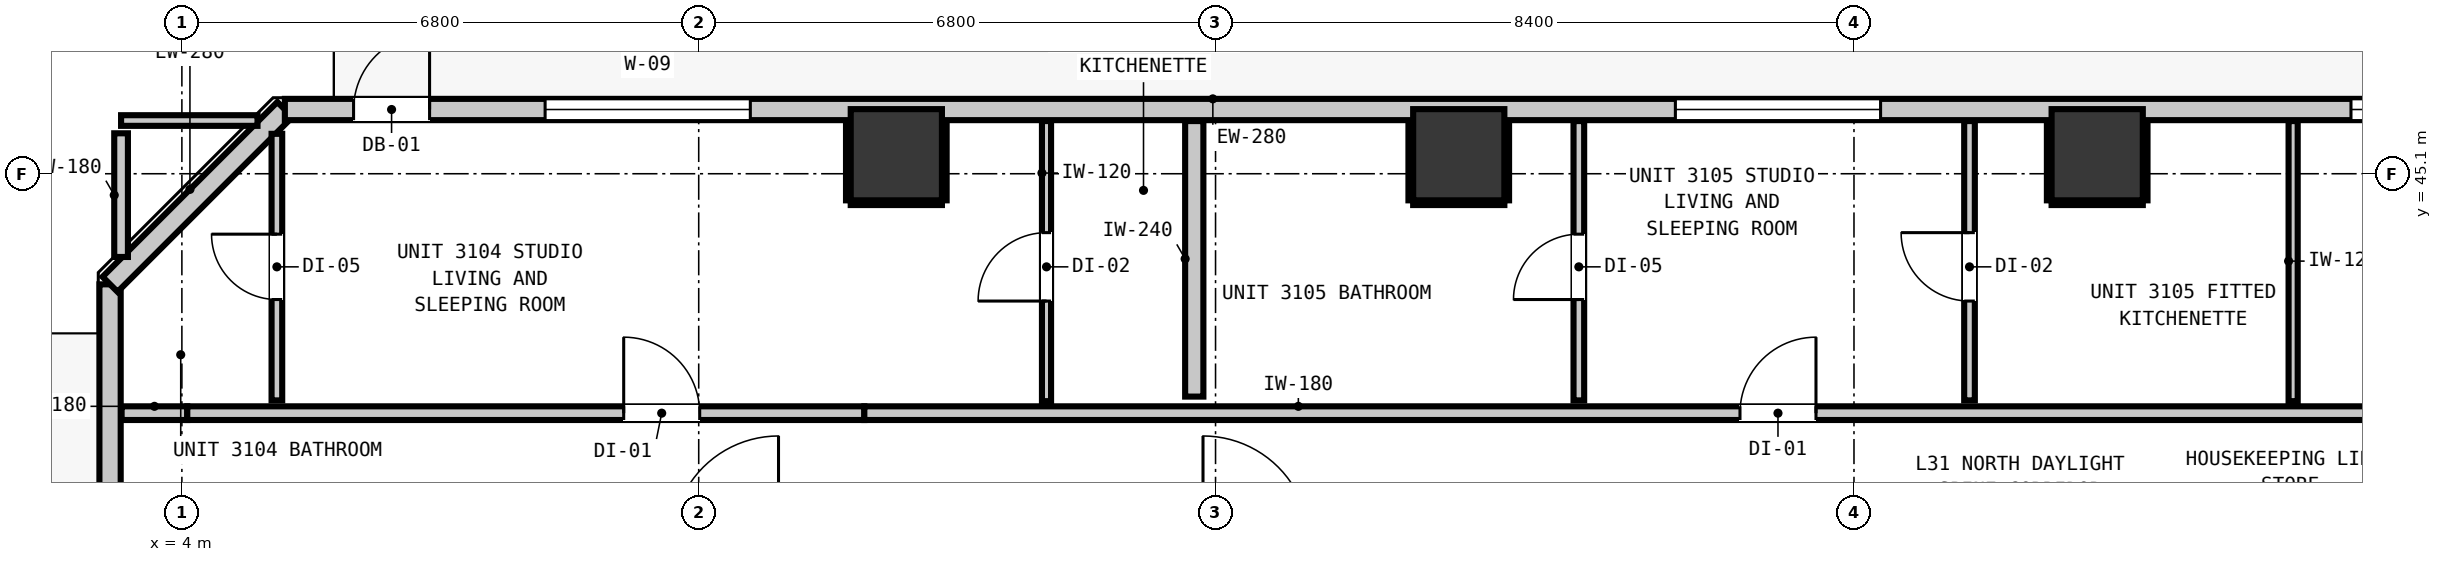
"""IFC4 building model, lengths in metres.
Left out: names, types, materials, properties, quantities, classifications, styles, units other than length and angle.
Written with IfcOpenShell. Run it as: python <this file> out.ifc"""

import sys

from ifc_helpers import new_model, si_unit, direction, frame, frame_2d, origin, origin_2d, place, context, subcontext, project, spatial, rectangle, extrude, element, fill, save


model = new_model("IFC4")
c1 = context("Model", 3, precision=1e-05, world=origin(), true_north=direction((0.0, 1.0)))
c2 = subcontext(c1, "Body", "Model", "MODEL_VIEW")
j1 = project(units=[si_unit("LENGTHUNIT", "METRE"), si_unit("PLANEANGLEUNIT", "RADIAN")], contexts=[c1])
p1 = place(None, origin())
s1 = spatial("IfcSite", under=j1, at=p1, CompositionType="ELEMENT")
p2 = place(p1, origin())
s2 = spatial("IfcBuilding", under=s1, at=p2, CompositionType="ELEMENT")
p3 = place(p2, frame((0.0, 0.0, 109.4)))
s3 = spatial("IfcBuildingStorey", under=s2, at=p3, CompositionType="ELEMENT", Elevation=109.4)
for number, where, z_axis, x_axis in (
    (1, (13.4, 45.35, 0.0), (0.0, 0.0, 1.0), (1.0, 0.0, 0.0)),
    (2, (20.8, 45.35, 0.0), (0.0, 0.0, 1.0), (1.0, 0.0, 0.0)),
    (3, (29.2, 45.35, 0.0), (0.0, 0.0, 1.0), (1.0, 0.0, 0.0)),
):
    element("IfcColumn", number, at=place(p3, frame(where, z_axis=z_axis, x_axis=x_axis)), inside=s3, PredefinedType="COLUMN", context=c2, shape_type="SweptSolid", body=[
        extrude(rectangle(XDim=1.2, YDim=1.2, at=origin_2d()), origin(), (0.0, 0.0, 1.0), 3.32),
    ])
p4 = place(p3, frame((3.055, 11.355, 0.0), z_axis=(0.0, 0.0, 1.0), x_axis=(0.0, 1.0, 0.0)))
e4 = element("IfcWall", 4, at=p4, inside=s3, PredefinedType="STANDARD", context=c2, shape_type="SweptSolid", body=[
    extrude(rectangle(XDim=32.29, YDim=0.28, at=frame_2d((16.145, 0.0))), origin(), (0.0, 0.0, 1.0), 3.08),
])
p5 = place(p4, frame((5.818, 0.0, 0.0)))
e5 = element("IfcOpeningElement", 5, at=p5, cuts=e4, PredefinedType="OPENING", context=c2, shape_type="SweptSolid", body=[
    extrude(rectangle(XDim=1.0, YDim=2.15, at=frame_2d((0.5, 1.075))), frame((0.0, 0.15, 0.0), z_axis=(0.0, -1.0, 0.0), x_axis=(1.0, 0.0, 0.0)), (0.0, 0.0, 1.0), 0.3),
])
p6 = place(p4, frame((0.545, 0.0, 0.85)))
e6 = element("IfcOpeningElement", 6, at=p6, cuts=e4, PredefinedType="OPENING", context=c2, shape_type="SweptSolid", body=[
    extrude(rectangle(XDim=1.05, YDim=1.65, at=frame_2d((0.525, 0.825))), frame((0.0, 0.15, 0.0), z_axis=(0.0, -1.0, 0.0), x_axis=(1.0, 0.0, 0.0)), (0.0, 0.0, 1.0), 0.3),
])
p7 = place(p4, frame((13.124, 0.0, 0.85)))
e7 = element("IfcOpeningElement", 7, at=p7, cuts=e4, PredefinedType="OPENING", context=c2, shape_type="SweptSolid", body=[
    extrude(rectangle(XDim=2.7, YDim=2.0, at=frame_2d((1.35, 1.0))), frame((0.0, 0.15, 0.0), z_axis=(0.0, -1.0, 0.0), x_axis=(1.0, 0.0, 0.0)), (0.0, 0.0, 1.0), 0.3),
])
p8 = place(p4, frame((17.188, 0.0, 0.85)))
e8 = element("IfcOpeningElement", 8, at=p8, cuts=e4, PredefinedType="OPENING", context=c2, shape_type="SweptSolid", body=[
    extrude(rectangle(XDim=1.05, YDim=1.65, at=frame_2d((0.525, 0.825))), frame((0.0, 0.15, 0.0), z_axis=(0.0, -1.0, 0.0), x_axis=(1.0, 0.0, 0.0)), (0.0, 0.0, 1.0), 0.3),
])
p9 = place(p4, frame((22.674, 0.0, 0.85)))
e9 = element("IfcOpeningElement", 9, at=p9, cuts=e4, PredefinedType="OPENING", context=c2, shape_type="SweptSolid", body=[
    extrude(rectangle(XDim=2.7, YDim=2.0, at=frame_2d((1.35, 1.0))), frame((0.0, 0.15, 0.0), z_axis=(0.0, -1.0, 0.0), x_axis=(1.0, 0.0, 0.0)), (0.0, 0.0, 1.0), 0.3),
])
p10 = place(p4, frame((26.312, 0.0, 0.85)))
e10 = element("IfcOpeningElement", 10, at=p10, cuts=e4, PredefinedType="OPENING", context=c2, shape_type="SweptSolid", body=[
    extrude(rectangle(XDim=1.05, YDim=1.65, at=frame_2d((0.525, 0.825))), frame((0.0, 0.15, 0.0), z_axis=(0.0, -1.0, 0.0), x_axis=(1.0, 0.0, 0.0)), (0.0, 0.0, 1.0), 0.3),
])
p11 = place(p3, frame((3.055, 43.645, 0.0), z_axis=(0.0, 0.0, 1.0), x_axis=(0.707106781187, 0.707106781187, 0.0)))
e11 = element("IfcWall", 11, at=p11, inside=s3, PredefinedType="STANDARD", context=c2, shape_type="SweptSolid", body=[
    extrude(rectangle(XDim=3.253, YDim=0.28, at=frame_2d((1.626, 0.0))), origin(), (0.0, 0.0, 1.0), 3.08),
])
p12 = place(p3, frame((5.355, 45.945, 0.0), z_axis=(0.0, 0.0, 1.0), x_axis=(1.0, 0.0, 0.0)))
e12 = element("IfcWall", 12, at=p12, inside=s3, PredefinedType="STANDARD", context=c2, shape_type="SweptSolid", body=[
    extrude(rectangle(XDim=35.09, YDim=0.28, at=frame_2d((17.545, 0.0))), origin(), (0.0, 0.0, 1.0), 3.08),
])
p13 = place(p12, frame((0.904, 0.0, 0.0)))
e13 = element("IfcOpeningElement", 13, at=p13, cuts=e12, PredefinedType="OPENING", context=c2, shape_type="SweptSolid", body=[
    extrude(rectangle(XDim=1.0, YDim=2.15, at=frame_2d((0.5, 1.075))), frame((0.0, 0.15, 0.0), z_axis=(0.0, -1.0, 0.0), x_axis=(1.0, 0.0, 0.0)), (0.0, 0.0, 1.0), 0.3),
])
p14 = place(p12, frame((3.424, 0.0, 0.85)))
e14 = element("IfcOpeningElement", 14, at=p14, cuts=e12, PredefinedType="OPENING", context=c2, shape_type="SweptSolid", body=[
    extrude(rectangle(XDim=2.7, YDim=2.0, at=frame_2d((1.35, 1.0))), frame((0.0, 0.15, 0.0), z_axis=(0.0, -1.0, 0.0), x_axis=(1.0, 0.0, 0.0)), (0.0, 0.0, 1.0), 0.3),
])
p15 = place(p12, frame((18.295, 0.0, 0.85)))
e15 = element("IfcOpeningElement", 15, at=p15, cuts=e12, PredefinedType="OPENING", context=c2, shape_type="SweptSolid", body=[
    extrude(rectangle(XDim=2.7, YDim=2.0, at=frame_2d((1.35, 1.0))), frame((0.0, 0.15, 0.0), z_axis=(0.0, -1.0, 0.0), x_axis=(1.0, 0.0, 0.0)), (0.0, 0.0, 1.0), 0.3),
])
p16 = place(p12, frame((27.184, 0.0, 0.85)))
e16 = element("IfcOpeningElement", 16, at=p16, cuts=e12, PredefinedType="OPENING", context=c2, shape_type="SweptSolid", body=[
    extrude(rectangle(XDim=2.7, YDim=2.0, at=frame_2d((1.35, 1.0))), frame((0.0, 0.15, 0.0), z_axis=(0.0, -1.0, 0.0), x_axis=(1.0, 0.0, 0.0)), (0.0, 0.0, 1.0), 0.3),
])
p17 = place(p3, frame((3.207, 41.95, 0.0), z_axis=(0.0, 0.0, 1.0), x_axis=(1.0, 0.0, 0.0)))
e17 = element("IfcWall", 17, at=p17, inside=s3, PredefinedType="PARTITIONING", context=c2, shape_type="SweptSolid", body=[
    extrude(rectangle(XDim=0.864, YDim=0.18, at=frame_2d((0.432, 0.0))), origin(), (0.0, 0.0, 1.0), 3.08),
])
p18 = place(p3, frame((4.071, 41.95, 0.0), z_axis=(0.0, 0.0, 1.0), x_axis=(1.0, 0.0, 0.0)))
e18 = element("IfcWall", 18, at=p18, inside=s3, PredefinedType="PARTITIONING", context=c2, shape_type="SweptSolid", body=[
    extrude(rectangle(XDim=8.908, YDim=0.18, at=frame_2d((4.454, 0.0))), origin(), (0.0, 0.0, 1.0), 2.565),
])
p19 = place(p18, frame((5.742, 0.0, 0.0)))
e19 = element("IfcOpeningElement", 19, at=p19, cuts=e18, PredefinedType="OPENING", context=c2, shape_type="SweptSolid", body=[
    extrude(rectangle(XDim=1.0, YDim=2.15, at=frame_2d((0.5, 1.075))), frame((0.0, 0.1, 0.0), z_axis=(0.0, -1.0, 0.0), x_axis=(1.0, 0.0, 0.0)), (0.0, 0.0, 1.0), 0.2),
])
p20 = place(p3, frame((12.979, 41.95, 0.0), z_axis=(0.0, 0.0, 1.0), x_axis=(1.0, 0.0, 0.0)))
e20 = element("IfcWall", 20, at=p20, inside=s3, PredefinedType="PARTITIONING", context=c2, shape_type="SweptSolid", body=[
    extrude(rectangle(XDim=29.614, YDim=0.18, at=frame_2d((14.807, 0.0))), origin(), (0.0, 0.0, 1.0), 3.08),
])
p21 = place(p20, frame((11.521, 0.0, 0.0)))
e21 = element("IfcOpeningElement", 21, at=p21, cuts=e20, PredefinedType="OPENING", context=c2, shape_type="SweptSolid", body=[
    extrude(rectangle(XDim=1.0, YDim=2.15, at=frame_2d((0.5, 1.075))), frame((0.0, 0.1, 0.0), z_axis=(0.0, -1.0, 0.0), x_axis=(1.0, 0.0, 0.0)), (0.0, 0.0, 1.0), 0.2),
])
p22 = place(p20, frame((23.736, 0.0, 0.0)))
e22 = element("IfcOpeningElement", 22, at=p22, cuts=e20, PredefinedType="OPENING", context=c2, shape_type="SweptSolid", body=[
    extrude(rectangle(XDim=0.9, YDim=2.1, at=frame_2d((0.45, 1.05))), frame((0.0, 0.1, 0.0), z_axis=(0.0, -1.0, 0.0), x_axis=(1.0, 0.0, 0.0)), (0.0, 0.0, 1.0), 0.2),
])
p23 = place(p3, frame((3.2, 45.8, 0.0), z_axis=(0.0, 0.0, 1.0), x_axis=(1.0, 0.0, 0.0)))
e23 = element("IfcWall", 23, at=p23, inside=s3, PredefinedType="PARTITIONING", context=c2, shape_type="SweptSolid", body=[
    extrude(rectangle(XDim=1.795, YDim=0.14, at=frame_2d((0.897, 0.0))), origin(), (0.0, 0.0, 1.0), 3.08),
])
p24 = place(p3, frame((17.32, 42.168, 0.0), z_axis=(0.0, 0.0, 1.0), x_axis=(0.0, 1.0, 0.0)))
e24 = element("IfcWall", 24, at=p24, inside=s3, PredefinedType="PARTITIONING", context=c2, shape_type="SweptSolid", body=[
    extrude(rectangle(XDim=3.625, YDim=0.24, at=frame_2d((1.812, 0.0))), origin(), (0.0, 0.0, 1.0), 3.08),
])
p25 = place(p3, frame((3.2, 44.005, 0.0), z_axis=(0.0, 0.0, 1.0), x_axis=(0.0, 1.0, 0.0)))
e25 = element("IfcWall", 25, at=p25, inside=s3, PredefinedType="PARTITIONING", context=c2, shape_type="SweptSolid", body=[
    extrude(rectangle(XDim=1.627, YDim=0.18, at=frame_2d((0.813, 0.0))), origin(), (0.0, 0.0, 1.0), 3.08),
])
p26 = place(p3, frame((5.25, 42.118, 0.0), z_axis=(0.0, 0.0, 1.0), x_axis=(0.0, 1.0, 0.0)))
e26 = element("IfcWall", 26, at=p26, inside=s3, PredefinedType="PARTITIONING", context=c2, shape_type="SweptSolid", body=[
    extrude(rectangle(XDim=3.507, YDim=0.14, at=frame_2d((1.753, 0.0))), origin(), (0.0, 0.0, 1.0), 3.08),
])
p27 = place(p26, frame((1.327, 0.0, 0.0)))
e27 = element("IfcOpeningElement", 27, at=p27, cuts=e26, PredefinedType="OPENING", context=c2, shape_type="SweptSolid", body=[
    extrude(rectangle(XDim=0.86, YDim=2.02, at=frame_2d((0.43, 1.01))), frame((0.0, 0.08, 0.0), z_axis=(0.0, -1.0, 0.0), x_axis=(1.0, 0.0, 0.0)), (0.0, 0.0, 1.0), 0.16),
])
p28 = place(p3, frame((22.38, 42.118, 0.0), z_axis=(0.0, 0.0, 1.0), x_axis=(0.0, 1.0, 0.0)))
e28 = element("IfcWall", 28, at=p28, inside=s3, PredefinedType="PARTITIONING", context=c2, shape_type="SweptSolid", body=[
    extrude(rectangle(XDim=3.675, YDim=0.14, at=frame_2d((1.837, 0.0))), origin(), (0.0, 0.0, 1.0), 3.08),
])
p29 = place(p28, frame((1.327, 0.0, 0.0)))
e29 = element("IfcOpeningElement", 29, at=p29, cuts=e28, PredefinedType="OPENING", context=c2, shape_type="SweptSolid", body=[
    extrude(rectangle(XDim=0.86, YDim=2.02, at=frame_2d((0.43, 1.01))), frame((0.0, 0.08, 0.0), z_axis=(0.0, -1.0, 0.0), x_axis=(1.0, 0.0, 0.0)), (0.0, 0.0, 1.0), 0.16),
])
p30 = place(p3, frame((27.52, 42.118, 0.0), z_axis=(0.0, 0.0, 1.0), x_axis=(0.0, 1.0, 0.0)))
e30 = element("IfcWall", 30, at=p30, inside=s3, PredefinedType="PARTITIONING", context=c2, shape_type="SweptSolid", body=[
    extrude(rectangle(XDim=3.675, YDim=0.14, at=frame_2d((1.837, 0.0))), origin(), (0.0, 0.0, 1.0), 3.08),
])
p31 = place(p30, frame((1.307, 0.0, 0.0)))
e31 = element("IfcOpeningElement", 31, at=p31, cuts=e30, PredefinedType="OPENING", context=c2, shape_type="SweptSolid", body=[
    extrude(rectangle(XDim=0.9, YDim=2.1, at=frame_2d((0.45, 1.05))), frame((0.0, 0.08, 0.0), z_axis=(0.0, -1.0, 0.0), x_axis=(1.0, 0.0, 0.0)), (0.0, 0.0, 1.0), 0.16),
])
p32 = place(p3, frame((15.376, 42.108, 0.0), z_axis=(0.0, 0.0, 1.0), x_axis=(0.0, 1.0, 0.0)))
e32 = element("IfcWall", 32, at=p32, inside=s3, PredefinedType="PARTITIONING", context=c2, shape_type="SweptSolid", body=[
    extrude(rectangle(XDim=3.685, YDim=0.12, at=frame_2d((1.843, 0.0))), origin(), (0.0, 0.0, 1.0), 3.08),
])
p33 = place(p32, frame((1.317, 0.0, 0.0)))
e33 = element("IfcOpeningElement", 33, at=p33, cuts=e32, PredefinedType="OPENING", context=c2, shape_type="SweptSolid", body=[
    extrude(rectangle(XDim=0.9, YDim=2.1, at=frame_2d((0.45, 1.05))), frame((0.0, 0.07, 0.0), z_axis=(0.0, -1.0, 0.0), x_axis=(1.0, 0.0, 0.0)), (0.0, 0.0, 1.0), 0.14),
])
p34 = place(p3, frame((31.778, 42.108, 0.0), z_axis=(0.0, 0.0, 1.0), x_axis=(0.0, 1.0, 0.0)))
e34 = element("IfcWall", 34, at=p34, inside=s3, PredefinedType="PARTITIONING", context=c2, shape_type="SweptSolid", body=[
    extrude(rectangle(XDim=3.685, YDim=0.12, at=frame_2d((1.843, 0.0))), origin(), (0.0, 0.0, 1.0), 3.08),
])
p35 = place(p3, frame((12.8, 44.718, 0.0), z_axis=(0.0, 0.0, 1.0), x_axis=(1.0, 0.0, 0.0)))
e35 = element("IfcWall", 35, at=p35, inside=s3, PredefinedType="PARTITIONING", context=c2, shape_type="SweptSolid", body=[
    extrude(rectangle(XDim=1.2, YDim=0.06, at=frame_2d((0.6, 0.0))), origin(), (0.0, 0.0, 1.0), 1.45),
])
for number, where, z_axis, x_axis in (
    (36, (12.768, 44.75, 0.0), (0.0, 0.0, 1.0), (0.0, 1.0, 0.0)),
    (37, (14.032, 44.75, 0.0), (0.0, 0.0, 1.0), (0.0, 1.0, 0.0)),
):
    element("IfcWall", number, at=place(p3, frame(where, z_axis=z_axis, x_axis=x_axis)), inside=s3, PredefinedType="PARTITIONING", context=c2, shape_type="SweptSolid", body=[
        extrude(rectangle(XDim=1.04, YDim=0.06, at=frame_2d((0.52, 0.0))), origin(), (0.0, 0.0, 1.0), 1.45),
    ])
p36 = place(p3, frame((20.2, 44.718, 0.0), z_axis=(0.0, 0.0, 1.0), x_axis=(1.0, 0.0, 0.0)))
e38 = element("IfcWall", 38, at=p36, inside=s3, PredefinedType="PARTITIONING", context=c2, shape_type="SweptSolid", body=[
    extrude(rectangle(XDim=1.2, YDim=0.06, at=frame_2d((0.6, 0.0))), origin(), (0.0, 0.0, 1.0), 1.45),
])
for number, where, z_axis, x_axis in (
    (39, (20.168, 44.75, 0.0), (0.0, 0.0, 1.0), (0.0, 1.0, 0.0)),
    (40, (21.432, 44.75, 0.0), (0.0, 0.0, 1.0), (0.0, 1.0, 0.0)),
):
    element("IfcWall", number, at=place(p3, frame(where, z_axis=z_axis, x_axis=x_axis)), inside=s3, PredefinedType="PARTITIONING", context=c2, shape_type="SweptSolid", body=[
        extrude(rectangle(XDim=1.04, YDim=0.06, at=frame_2d((0.52, 0.0))), origin(), (0.0, 0.0, 1.0), 1.45),
    ])
p37 = place(p3, frame((28.6, 44.718, 0.0), z_axis=(0.0, 0.0, 1.0), x_axis=(1.0, 0.0, 0.0)))
e41 = element("IfcWall", 41, at=p37, inside=s3, PredefinedType="PARTITIONING", context=c2, shape_type="SweptSolid", body=[
    extrude(rectangle(XDim=1.2, YDim=0.06, at=frame_2d((0.6, 0.0))), origin(), (0.0, 0.0, 1.0), 1.45),
])
for number, where, z_axis, x_axis in (
    (42, (28.568, 44.75, 0.0), (0.0, 0.0, 1.0), (0.0, 1.0, 0.0)),
    (43, (29.832, 44.75, 0.0), (0.0, 0.0, 1.0), (0.0, 1.0, 0.0)),
):
    element("IfcWall", number, at=place(p3, frame(where, z_axis=z_axis, x_axis=x_axis)), inside=s3, PredefinedType="PARTITIONING", context=c2, shape_type="SweptSolid", body=[
        extrude(rectangle(XDim=1.04, YDim=0.06, at=frame_2d((0.52, 0.0))), origin(), (0.0, 0.0, 1.0), 1.45),
    ])
p38 = place(p13, origin())
e44 = element("IfcDoor", 44, at=p38, inside=s3, OperationType="SINGLE_SWING_RIGHT", PredefinedType="DOOR", context=c2, shape_type="SweptSolid", body=[
    extrude(rectangle(XDim=1.0, YDim=2.15, at=frame_2d((0.5, 1.075))), frame((0.0, 0.025, 0.0), z_axis=(0.0, -1.0, 0.0), x_axis=(1.0, 0.0, 0.0)), (0.0, 0.0, 1.0), 0.05),
])
fill(e13, e44)
p39 = place(p14, origin())
e45 = element("IfcWindow", 45, at=p39, inside=s3, PartitioningType="SINGLE_PANEL", PredefinedType="WINDOW", context=c2, shape_type="SweptSolid", body=[
    extrude(rectangle(XDim=2.7, YDim=2.0, at=frame_2d((1.35, 1.0))), frame((0.0, 0.03, 0.0), z_axis=(0.0, -1.0, 0.0), x_axis=(1.0, 0.0, 0.0)), (0.0, 0.0, 1.0), 0.06),
])
fill(e14, e45)
p40 = place(p15, origin())
e46 = element("IfcWindow", 46, at=p40, inside=s3, PartitioningType="SINGLE_PANEL", PredefinedType="WINDOW", context=c2, shape_type="SweptSolid", body=[
    extrude(rectangle(XDim=2.7, YDim=2.0, at=frame_2d((1.35, 1.0))), frame((0.0, 0.03, 0.0), z_axis=(0.0, -1.0, 0.0), x_axis=(1.0, 0.0, 0.0)), (0.0, 0.0, 1.0), 0.06),
])
fill(e15, e46)
p41 = place(p16, origin())
e47 = element("IfcWindow", 47, at=p41, inside=s3, PartitioningType="SINGLE_PANEL", PredefinedType="WINDOW", context=c2, shape_type="SweptSolid", body=[
    extrude(rectangle(XDim=2.7, YDim=2.0, at=frame_2d((1.35, 1.0))), frame((0.0, 0.03, 0.0), z_axis=(0.0, -1.0, 0.0), x_axis=(1.0, 0.0, 0.0)), (0.0, 0.0, 1.0), 0.06),
])
fill(e16, e47)
p42 = place(p19, origin())
e48 = element("IfcDoor", 48, at=p42, inside=s3, OperationType="SINGLE_SWING_LEFT", PredefinedType="DOOR", context=c2, shape_type="SweptSolid", body=[
    extrude(rectangle(XDim=1.0, YDim=2.15, at=frame_2d((0.5, 1.075))), frame((0.0, 0.025, 0.0), z_axis=(0.0, -1.0, 0.0), x_axis=(1.0, 0.0, 0.0)), (0.0, 0.0, 1.0), 0.05),
])
fill(e19, e48)
p43 = place(p27, origin())
e49 = element("IfcDoor", 49, at=p43, inside=s3, OperationType="SINGLE_SWING_RIGHT", PredefinedType="DOOR", context=c2, shape_type="SweptSolid", body=[
    extrude(rectangle(XDim=0.86, YDim=2.02, at=frame_2d((0.43, 1.01))), frame((0.0, 0.025, 0.0), z_axis=(0.0, -1.0, 0.0), x_axis=(1.0, 0.0, 0.0)), (0.0, 0.0, 1.0), 0.05),
])
fill(e27, e49)
p44 = place(p33, origin())
e50 = element("IfcDoor", 50, at=p44, inside=s3, OperationType="SINGLE_SWING_LEFT", PredefinedType="DOOR", context=c2, shape_type="SweptSolid", body=[
    extrude(rectangle(XDim=0.9, YDim=2.1, at=frame_2d((0.45, 1.05))), frame((0.0, 0.025, 0.0), z_axis=(0.0, -1.0, 0.0), x_axis=(1.0, 0.0, 0.0)), (0.0, 0.0, 1.0), 0.05),
])
fill(e33, e50)
p45 = place(p21, origin())
e51 = element("IfcDoor", 51, at=p45, inside=s3, OperationType="SINGLE_SWING_RIGHT", PredefinedType="DOOR", context=c2, shape_type="SweptSolid", body=[
    extrude(rectangle(XDim=1.0, YDim=2.15, at=frame_2d((0.5, 1.075))), frame((0.0, 0.025, 0.0), z_axis=(0.0, -1.0, 0.0), x_axis=(1.0, 0.0, 0.0)), (0.0, 0.0, 1.0), 0.05),
])
fill(e21, e51)
p46 = place(p29, origin())
e52 = element("IfcDoor", 52, at=p46, inside=s3, OperationType="SINGLE_SWING_LEFT", PredefinedType="DOOR", context=c2, shape_type="SweptSolid", body=[
    extrude(rectangle(XDim=0.86, YDim=2.02, at=frame_2d((0.43, 1.01))), frame((0.0, 0.025, 0.0), z_axis=(0.0, -1.0, 0.0), x_axis=(1.0, 0.0, 0.0)), (0.0, 0.0, 1.0), 0.05),
])
fill(e29, e52)
p47 = place(p31, origin())
e53 = element("IfcDoor", 53, at=p47, inside=s3, OperationType="SINGLE_SWING_RIGHT", PredefinedType="DOOR", context=c2, shape_type="SweptSolid", body=[
    extrude(rectangle(XDim=0.9, YDim=2.1, at=frame_2d((0.45, 1.05))), frame((0.0, 0.025, 0.0), z_axis=(0.0, -1.0, 0.0), x_axis=(1.0, 0.0, 0.0)), (0.0, 0.0, 1.0), 0.05),
])
fill(e31, e53)
save(model, sys.argv[1])
